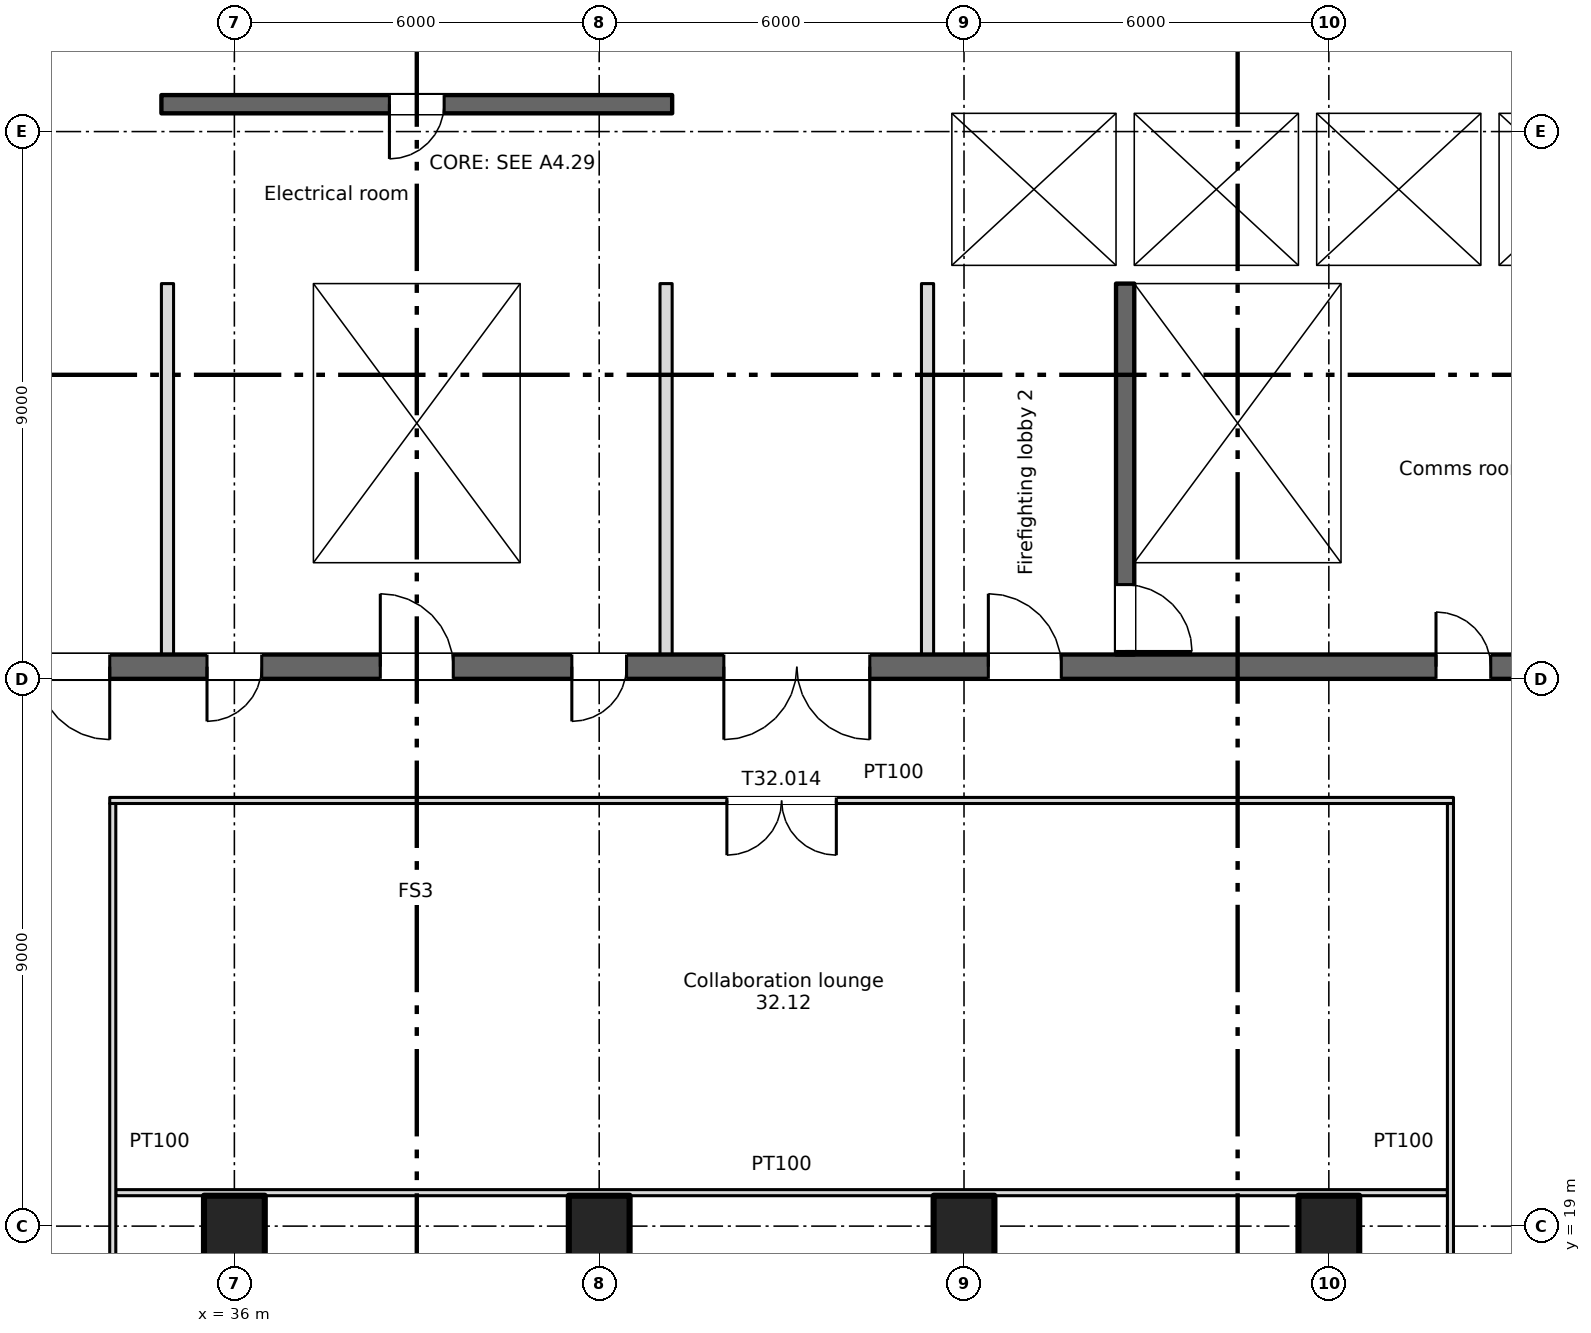
"""IFC4 building model, lengths in metres.
Left out: names, types, materials, properties, quantities, classifications, styles, units other than length and angle.
Written with IfcOpenShell. Run it as: python <this file> out.ifc"""

import sys

from ifc_helpers import new_model, si_unit, direction, frame, frame_2d, origin, origin_2d, place, context, subcontext, project, spatial, rectangle, extrude, element, fill, save


model = new_model("IFC4")
c1 = context("Model", 3, precision=1e-05, world=origin(), true_north=direction((0.0, 1.0)))
c2 = subcontext(c1, "Body", "Model", "MODEL_VIEW")
j1 = project(units=[si_unit("LENGTHUNIT", "METRE"), si_unit("PLANEANGLEUNIT", "RADIAN")], contexts=[c1])
p1 = place(None, origin())
s1 = spatial("IfcSite", under=j1, at=p1, CompositionType="ELEMENT")
p2 = place(p1, origin())
s2 = spatial("IfcBuilding", under=s1, at=p2, CompositionType="ELEMENT")
p3 = place(p2, frame((0.0, 0.0, 223.0)))
s3 = spatial("IfcBuildingStorey", under=s2, at=p3, CompositionType="ELEMENT", Elevation=223.0)
for number, where, z_axis, x_axis in (
    (1, (36.0, 19.0, 0.0), (0.0, 0.0, 1.0), (1.0, 0.0, 0.0)),
    (2, (42.0, 19.0, 0.0), (0.0, 0.0, 1.0), (1.0, 0.0, 0.0)),
    (3, (48.0, 19.0, 0.0), (0.0, 0.0, 1.0), (1.0, 0.0, 0.0)),
    (4, (54.0, 19.0, 0.0), (0.0, 0.0, 1.0), (1.0, 0.0, 0.0)),
):
    element("IfcColumn", number, at=place(p3, frame(where, z_axis=z_axis, x_axis=x_axis)), inside=s3, PredefinedType="COLUMN", context=c2, shape_type="SweptSolid", body=[
        extrude(rectangle(XDim=1.0, YDim=1.0, at=origin_2d()), origin(), (0.0, 0.0, 1.0), 3.15),
    ])
p4 = place(p3, frame((6.6, 28.2, 0.0), z_axis=(0.0, 0.0, 1.0), x_axis=(1.0, 0.0, 0.0)))
e5 = element("IfcWall", 5, at=p4, inside=s3, PredefinedType="SHEAR", context=c2, shape_type="SweptSolid", body=[
    extrude(rectangle(XDim=57.9, YDim=0.4, at=frame_2d((28.95, 0.0))), origin(), (0.0, 0.0, 1.0), 3.15),
])
p5 = place(p4, frame((12.163, 0.0, 0.0)))
e6 = element("IfcOpeningElement", 6, at=p5, cuts=e5, PredefinedType="OPENING", context=c2, shape_type="SweptSolid", body=[
    extrude(rectangle(XDim=0.9, YDim=2.1, at=frame_2d((0.45, 1.05))), frame((0.0, 0.21, 0.0), z_axis=(0.0, -1.0, 0.0), x_axis=(1.0, 0.0, 0.0)), (0.0, 0.0, 1.0), 0.42),
])
p6 = place(p4, frame((14.738, 0.0, 0.0)))
e7 = element("IfcOpeningElement", 7, at=p6, cuts=e5, PredefinedType="OPENING", context=c2, shape_type="SweptSolid", body=[
    extrude(rectangle(XDim=0.9, YDim=2.1, at=frame_2d((0.45, 1.05))), frame((0.0, 0.21, 0.0), z_axis=(0.0, -1.0, 0.0), x_axis=(1.0, 0.0, 0.0)), (0.0, 0.0, 1.0), 0.42),
])
p7 = place(p4, frame((49.163, 0.0, 0.0)))
e8 = element("IfcOpeningElement", 8, at=p7, cuts=e5, PredefinedType="OPENING", context=c2, shape_type="SweptSolid", body=[
    extrude(rectangle(XDim=0.9, YDim=2.1, at=frame_2d((0.45, 1.05))), frame((0.0, 0.21, 0.0), z_axis=(0.0, -1.0, 0.0), x_axis=(1.0, 0.0, 0.0)), (0.0, 0.0, 1.0), 0.42),
])
p8 = place(p4, frame((51.738, 0.0, 0.0)))
e9 = element("IfcOpeningElement", 9, at=p8, cuts=e5, PredefinedType="OPENING", context=c2, shape_type="SweptSolid", body=[
    extrude(rectangle(XDim=0.9, YDim=2.1, at=frame_2d((0.45, 1.05))), frame((0.0, 0.21, 0.0), z_axis=(0.0, -1.0, 0.0), x_axis=(1.0, 0.0, 0.0)), (0.0, 0.0, 1.0), 0.42),
])
p9 = place(p4, frame((1.45, 0.0, 0.0)))
e10 = element("IfcOpeningElement", 10, at=p9, cuts=e5, PredefinedType="OPENING", context=c2, shape_type="SweptSolid", body=[
    extrude(rectangle(XDim=0.9, YDim=2.1, at=frame_2d((0.45, 1.05))), frame((0.0, 0.21, 0.0), z_axis=(0.0, -1.0, 0.0), x_axis=(1.0, 0.0, 0.0)), (0.0, 0.0, 1.0), 0.42),
])
p10 = place(p4, frame((4.8, 0.0, 0.0)))
e11 = element("IfcOpeningElement", 11, at=p10, cuts=e5, PredefinedType="OPENING", context=c2, shape_type="SweptSolid", body=[
    extrude(rectangle(XDim=1.2, YDim=2.1, at=frame_2d((0.6, 1.05))), frame((0.0, 0.21, 0.0), z_axis=(0.0, -1.0, 0.0), x_axis=(1.0, 0.0, 0.0)), (0.0, 0.0, 1.0), 0.42),
])
p11 = place(p4, frame((31.8, 0.0, 0.0)))
e12 = element("IfcOpeningElement", 12, at=p11, cuts=e5, PredefinedType="OPENING", context=c2, shape_type="SweptSolid", body=[
    extrude(rectangle(XDim=1.2, YDim=2.1, at=frame_2d((0.6, 1.05))), frame((0.0, 0.21, 0.0), z_axis=(0.0, -1.0, 0.0), x_axis=(1.0, 0.0, 0.0)), (0.0, 0.0, 1.0), 0.42),
])
p12 = place(p4, frame((55.3, 0.0, 0.0)))
e13 = element("IfcOpeningElement", 13, at=p12, cuts=e5, PredefinedType="OPENING", context=c2, shape_type="SweptSolid", body=[
    extrude(rectangle(XDim=1.2, YDim=2.1, at=frame_2d((0.6, 1.05))), frame((0.0, 0.21, 0.0), z_axis=(0.0, -1.0, 0.0), x_axis=(1.0, 0.0, 0.0)), (0.0, 0.0, 1.0), 0.42),
])
p13 = place(p4, frame((21.8, 0.0, 0.0)))
e14 = element("IfcOpeningElement", 14, at=p13, cuts=e5, PredefinedType="OPENING", context=c2, shape_type="SweptSolid", body=[
    extrude(rectangle(XDim=1.2, YDim=2.1, at=frame_2d((0.6, 1.05))), frame((0.0, 0.21, 0.0), z_axis=(0.0, -1.0, 0.0), x_axis=(1.0, 0.0, 0.0)), (0.0, 0.0, 1.0), 0.42),
])
p14 = place(p4, frame((41.8, 0.0, 0.0)))
e15 = element("IfcOpeningElement", 15, at=p14, cuts=e5, PredefinedType="OPENING", context=c2, shape_type="SweptSolid", body=[
    extrude(rectangle(XDim=1.2, YDim=2.1, at=frame_2d((0.6, 1.05))), frame((0.0, 0.21, 0.0), z_axis=(0.0, -1.0, 0.0), x_axis=(1.0, 0.0, 0.0)), (0.0, 0.0, 1.0), 0.42),
])
p15 = place(p4, frame((24.95, 0.0, 0.0)))
e16 = element("IfcOpeningElement", 16, at=p15, cuts=e5, PredefinedType="OPENING", context=c2, shape_type="SweptSolid", body=[
    extrude(rectangle(XDim=2.4, YDim=2.1, at=frame_2d((1.2, 1.05))), frame((0.0, 0.21, 0.0), z_axis=(0.0, -1.0, 0.0), x_axis=(1.0, 0.0, 0.0)), (0.0, 0.0, 1.0), 0.42),
])
p16 = place(p4, frame((37.45, 0.0, 0.0)))
e17 = element("IfcOpeningElement", 17, at=p16, cuts=e5, PredefinedType="OPENING", context=c2, shape_type="SweptSolid", body=[
    extrude(rectangle(XDim=2.4, YDim=2.1, at=frame_2d((1.2, 1.05))), frame((0.0, 0.21, 0.0), z_axis=(0.0, -1.0, 0.0), x_axis=(1.0, 0.0, 0.0)), (0.0, 0.0, 1.0), 0.42),
])
p17 = place(p4, frame((8.1, 0.0, 0.0)))
e18 = element("IfcOpeningElement", 18, at=p17, cuts=e5, PredefinedType="OPENING", context=c2, shape_type="SweptSolid", body=[
    extrude(rectangle(XDim=2.4, YDim=2.1, at=frame_2d((1.2, 1.05))), frame((0.0, 0.21, 0.0), z_axis=(0.0, -1.0, 0.0), x_axis=(1.0, 0.0, 0.0)), (0.0, 0.0, 1.0), 0.42),
])
p18 = place(p4, frame((28.95, 0.0, 0.0)))
e19 = element("IfcOpeningElement", 19, at=p18, cuts=e5, PredefinedType="OPENING", context=c2, shape_type="SweptSolid", body=[
    extrude(rectangle(XDim=0.9, YDim=2.1, at=frame_2d((0.45, 1.05))), frame((0.0, 0.21, 0.0), z_axis=(0.0, -1.0, 0.0), x_axis=(1.0, 0.0, 0.0)), (0.0, 0.0, 1.0), 0.42),
])
p19 = place(p4, frame((34.95, 0.0, 0.0)))
e20 = element("IfcOpeningElement", 20, at=p19, cuts=e5, PredefinedType="OPENING", context=c2, shape_type="SweptSolid", body=[
    extrude(rectangle(XDim=0.9, YDim=2.1, at=frame_2d((0.45, 1.05))), frame((0.0, 0.21, 0.0), z_axis=(0.0, -1.0, 0.0), x_axis=(1.0, 0.0, 0.0)), (0.0, 0.0, 1.0), 0.42),
])
for number, where, z_axis, x_axis in (
    (21, (37.15, 28.4, 0.0), (0.0, 0.0, 1.0), (0.0, 1.0, 0.0)),
    (22, (40.85, 28.4, 0.0), (0.0, 0.0, 1.0), (0.0, 1.0, 0.0)),
):
    element("IfcWall", number, at=place(p3, frame(where, z_axis=z_axis, x_axis=x_axis)), inside=s3, PredefinedType="SHEAR", context=c2, shape_type="SweptSolid", body=[
        extrude(rectangle(XDim=6.1, YDim=0.3, at=frame_2d((3.05, 0.0))), origin(), (0.0, 0.0, 1.0), 3.15),
    ])
p20 = place(p3, frame((50.65, 34.5, 0.0), z_axis=(0.0, 0.0, 1.0), x_axis=(0.0, -1.0, 0.0)))
e23 = element("IfcWall", 23, at=p20, inside=s3, PredefinedType="SHEAR", context=c2, shape_type="SweptSolid", body=[
    extrude(rectangle(XDim=6.1, YDim=0.3, at=frame_2d((3.05, 0.0))), origin(), (0.0, 0.0, 1.0), 3.15),
])
p21 = place(p20, frame((4.95, 0.0, 0.0)))
e24 = element("IfcOpeningElement", 24, at=p21, cuts=e23, PredefinedType="OPENING", context=c2, shape_type="SweptSolid", body=[
    extrude(rectangle(XDim=1.1, YDim=2.1, at=frame_2d((0.55, 1.05))), frame((0.0, 0.16, 0.0), z_axis=(0.0, -1.0, 0.0), x_axis=(1.0, 0.0, 0.0)), (0.0, 0.0, 1.0), 0.32),
])
p22 = place(p3, frame((54.35, 28.4, 0.0), z_axis=(0.0, 0.0, 1.0), x_axis=(0.0, 1.0, 0.0)))
e25 = element("IfcWall", 25, at=p22, inside=s3, PredefinedType="SHEAR", context=c2, shape_type="SweptSolid", body=[
    extrude(rectangle(XDim=6.1, YDim=0.3, at=frame_2d((3.05, 0.0))), origin(), (0.0, 0.0, 1.0), 3.15),
])
p23 = place(p3, frame((34.8, 34.65, 0.0), z_axis=(0.0, 0.0, 1.0), x_axis=(1.0, 0.0, 0.0)))
e26 = element("IfcWall", 26, at=p23, inside=s3, PredefinedType="SHEAR", context=c2, shape_type="SweptSolid", body=[
    extrude(rectangle(XDim=8.4, YDim=0.3, at=frame_2d((4.2, 0.0))), origin(), (0.0, 0.0, 1.0), 3.15),
])
p24 = place(p3, frame((47.3, 34.65, 0.0), z_axis=(0.0, 0.0, 1.0), x_axis=(1.0, 0.0, 0.0)))
e27 = element("IfcWall", 27, at=p24, inside=s3, PredefinedType="SHEAR", context=c2, shape_type="SweptSolid", body=[
    extrude(rectangle(XDim=12.2, YDim=0.3, at=frame_2d((6.1, 0.0))), origin(), (0.0, 0.0, 1.0), 3.15),
])
p25 = place(p24, frame((1.3, 0.0, 0.0)))
e28 = element("IfcOpeningElement", 28, at=p25, cuts=e27, PredefinedType="OPENING", context=c2, shape_type="SweptSolid", body=[
    extrude(rectangle(XDim=1.1, YDim=2.1, at=frame_2d((0.55, 1.05))), frame((0.0, 0.16, 0.0), z_axis=(0.0, -1.0, 0.0), x_axis=(1.0, 0.0, 0.0)), (0.0, 0.0, 1.0), 0.32),
])
p26 = place(p3, frame((43.2, 37.45, 0.0), z_axis=(0.0, 0.0, 1.0), x_axis=(-1.0, 0.0, 0.0)))
e29 = element("IfcWall", 29, at=p26, inside=s3, PredefinedType="SHEAR", context=c2, shape_type="SweptSolid", body=[
    extrude(rectangle(XDim=8.4, YDim=0.3, at=frame_2d((4.2, 0.0))), origin(), (0.0, 0.0, 1.0), 3.15),
])
p27 = place(p26, frame((3.75, 0.0, 0.0)))
e30 = element("IfcOpeningElement", 30, at=p27, cuts=e29, PredefinedType="OPENING", context=c2, shape_type="SweptSolid", body=[
    extrude(rectangle(XDim=0.9, YDim=2.1, at=frame_2d((0.45, 1.05))), frame((0.0, 0.16, 0.0), z_axis=(0.0, -1.0, 0.0), x_axis=(1.0, 0.0, 0.0)), (0.0, 0.0, 1.0), 0.32),
])
p28 = place(p3, frame((47.3, 37.45, 0.0), z_axis=(0.0, 0.0, 1.0), x_axis=(1.0, 0.0, 0.0)))
e31 = element("IfcWall", 31, at=p28, inside=s3, PredefinedType="SHEAR", context=c2, shape_type="SweptSolid", body=[
    extrude(rectangle(XDim=12.2, YDim=0.3, at=frame_2d((6.1, 0.0))), origin(), (0.0, 0.0, 1.0), 3.15),
])
p29 = place(p28, frame((4.3, 0.0, 0.0)))
e32 = element("IfcOpeningElement", 32, at=p29, cuts=e31, PredefinedType="OPENING", context=c2, shape_type="SweptSolid", body=[
    extrude(rectangle(XDim=1.1, YDim=2.1, at=frame_2d((0.55, 1.05))), frame((0.0, 0.16, 0.0), z_axis=(0.0, -1.0, 0.0), x_axis=(1.0, 0.0, 0.0)), (0.0, 0.0, 1.0), 0.32),
])
p30 = place(p28, frame((7.3, 0.0, 0.0)))
e33 = element("IfcOpeningElement", 33, at=p30, cuts=e31, PredefinedType="OPENING", context=c2, shape_type="SweptSolid", body=[
    extrude(rectangle(XDim=1.1, YDim=2.1, at=frame_2d((0.55, 1.05))), frame((0.0, 0.16, 0.0), z_axis=(0.0, -1.0, 0.0), x_axis=(1.0, 0.0, 0.0)), (0.0, 0.0, 1.0), 0.32),
])
p31 = place(p28, frame((10.3, 0.0, 0.0)))
e34 = element("IfcOpeningElement", 34, at=p31, cuts=e31, PredefinedType="OPENING", context=c2, shape_type="SweptSolid", body=[
    extrude(rectangle(XDim=1.1, YDim=2.1, at=frame_2d((0.55, 1.05))), frame((0.0, 0.16, 0.0), z_axis=(0.0, -1.0, 0.0), x_axis=(1.0, 0.0, 0.0)), (0.0, 0.0, 1.0), 0.32),
])
for number, where, z_axis, x_axis in (
    (35, (34.95, 34.8, 0.0), (0.0, 0.0, 1.0), (0.0, 1.0, 0.0)),
    (36, (43.05, 34.8, 0.0), (0.0, 0.0, 1.0), (0.0, 1.0, 0.0)),
):
    element("IfcWall", number, at=place(p3, frame(where, z_axis=z_axis, x_axis=x_axis)), inside=s3, PredefinedType="SHEAR", context=c2, shape_type="SweptSolid", body=[
        extrude(rectangle(XDim=2.5, YDim=0.3, at=frame_2d((1.25, 0.0))), origin(), (0.0, 0.0, 1.0), 3.15),
    ])
p32 = place(p3, frame((47.55, 34.8, 0.0), z_axis=(0.0, 0.0, 1.0), x_axis=(0.0, 1.0, 0.0)))
e37 = element("IfcWall", 37, at=p32, inside=s3, PredefinedType="SHEAR", context=c2, shape_type="SweptSolid", body=[
    extrude(rectangle(XDim=2.5, YDim=0.5, at=frame_2d((1.25, 0.0))), origin(), (0.0, 0.0, 1.0), 3.15),
])
for number, where, z_axis, x_axis in (
    (38, (50.65, 34.8, 0.0), (0.0, 0.0, 1.0), (0.0, 1.0, 0.0)),
    (39, (53.65, 34.8, 0.0), (0.0, 0.0, 1.0), (0.0, 1.0, 0.0)),
    (40, (56.65, 34.8, 0.0), (0.0, 0.0, 1.0), (0.0, 1.0, 0.0)),
):
    element("IfcWall", number, at=place(p3, frame(where, z_axis=z_axis, x_axis=x_axis)), inside=s3, PredefinedType="SHEAR", context=c2, shape_type="SweptSolid", body=[
        extrude(rectangle(XDim=2.5, YDim=0.3, at=frame_2d((1.25, 0.0))), origin(), (0.0, 0.0, 1.0), 3.15),
    ])
for number, where, z_axis, x_axis in (
    (41, (34.9, 28.4, 0.0), (0.0, 0.0, 1.0), (0.0, 1.0, 0.0)),
    (42, (43.1, 28.4, 0.0), (0.0, 0.0, 1.0), (0.0, 1.0, 0.0)),
    (43, (47.4, 28.4, 0.0), (0.0, 0.0, 1.0), (0.0, 1.0, 0.0)),
):
    element("IfcWall", number, at=place(p3, frame(where, z_axis=z_axis, x_axis=x_axis)), inside=s3, PredefinedType="PARTITIONING", context=c2, shape_type="SweptSolid", body=[
        extrude(rectangle(XDim=6.1, YDim=0.2, at=frame_2d((3.05, 0.0))), origin(), (0.0, 0.0, 1.0), 3.15),
    ])
p33 = place(p3, frame((34.05, 19.55, 0.0), z_axis=(0.0, 0.0, 1.0), x_axis=(1.0, 0.0, 0.0)))
e44 = element("IfcWall", 44, at=p33, inside=s3, PredefinedType="PARTITIONING", context=c2, shape_type="SweptSolid", body=[
    extrude(rectangle(XDim=21.9, YDim=0.1, at=frame_2d((10.95, 0.0))), origin(), (0.0, 0.0, 1.0), 3.15),
])
p34 = place(p3, frame((33.95, 26.0, 0.0), z_axis=(0.0, 0.0, 1.0), x_axis=(1.0, 0.0, 0.0)))
e45 = element("IfcWall", 45, at=p34, inside=s3, PredefinedType="PARTITIONING", context=c2, shape_type="SweptSolid", body=[
    extrude(rectangle(XDim=22.1, YDim=0.1, at=frame_2d((11.05, 0.0))), origin(), (0.0, 0.0, 1.0), 3.15),
])
p35 = place(p34, frame((10.15, 0.0, 0.0)))
e46 = element("IfcOpeningElement", 46, at=p35, cuts=e45, PredefinedType="OPENING", context=c2, shape_type="SweptSolid", body=[
    extrude(rectangle(XDim=1.8, YDim=2.1, at=frame_2d((0.9, 1.05))), frame((0.0, 0.06, 0.0), z_axis=(0.0, -1.0, 0.0), x_axis=(1.0, 0.0, 0.0)), (0.0, 0.0, 1.0), 0.12),
])
for number, where, z_axis, x_axis in (
    (47, (34.0, 12.6, 0.0), (0.0, 0.0, 1.0), (0.0, 1.0, 0.0)),
    (48, (56.0, 12.6, 0.0), (0.0, 0.0, 1.0), (0.0, 1.0, 0.0)),
):
    element("IfcWall", number, at=place(p3, frame(where, z_axis=z_axis, x_axis=x_axis)), inside=s3, PredefinedType="PARTITIONING", context=c2, shape_type="SweptSolid", body=[
        extrude(rectangle(XDim=13.35, YDim=0.1, at=frame_2d((6.675, 0.0))), origin(), (0.0, 0.0, 1.0), 3.15),
    ])
p36 = place(p7, origin())
e49 = element("IfcDoor", 49, at=p36, inside=s3, OperationType="SINGLE_SWING_LEFT", PredefinedType="DOOR", context=c2, shape_type="SweptSolid", body=[
    extrude(rectangle(XDim=0.9, YDim=2.1, at=frame_2d((0.45, 1.05))), frame((0.0, 0.025, 0.0), z_axis=(0.0, -1.0, 0.0), x_axis=(1.0, 0.0, 0.0)), (0.0, 0.0, 1.0), 0.05),
])
fill(e8, e49)
p37 = place(p27, origin())
e50 = element("IfcDoor", 50, at=p37, inside=s3, OperationType="SINGLE_SWING_RIGHT", PredefinedType="DOOR", context=c2, shape_type="SweptSolid", body=[
    extrude(rectangle(XDim=0.9, YDim=2.1, at=frame_2d((0.45, 1.05))), frame((0.0, 0.025, 0.0), z_axis=(0.0, -1.0, 0.0), x_axis=(1.0, 0.0, 0.0)), (0.0, 0.0, 1.0), 0.05),
])
fill(e30, e50)
p38 = place(p29, origin())
e51 = element("IfcDoor", 51, at=p38, inside=s3, OperationType="SLIDING_TO_LEFT", PredefinedType="DOOR", context=c2, shape_type="SweptSolid", body=[
    extrude(rectangle(XDim=1.1, YDim=2.1, at=frame_2d((0.55, 1.05))), frame((0.0, 0.025, 0.0), z_axis=(0.0, -1.0, 0.0), x_axis=(1.0, 0.0, 0.0)), (0.0, 0.0, 1.0), 0.05),
])
fill(e32, e51)
p39 = place(p30, origin())
e52 = element("IfcDoor", 52, at=p39, inside=s3, OperationType="SLIDING_TO_LEFT", PredefinedType="DOOR", context=c2, shape_type="SweptSolid", body=[
    extrude(rectangle(XDim=1.1, YDim=2.1, at=frame_2d((0.55, 1.05))), frame((0.0, 0.025, 0.0), z_axis=(0.0, -1.0, 0.0), x_axis=(1.0, 0.0, 0.0)), (0.0, 0.0, 1.0), 0.05),
])
fill(e33, e52)
p40 = place(p25, origin())
e53 = element("IfcDoor", 53, at=p40, inside=s3, OperationType="SLIDING_TO_LEFT", PredefinedType="DOOR", context=c2, shape_type="SweptSolid", body=[
    extrude(rectangle(XDim=1.1, YDim=2.1, at=frame_2d((0.55, 1.05))), frame((0.0, 0.025, 0.0), z_axis=(0.0, -1.0, 0.0), x_axis=(1.0, 0.0, 0.0)), (0.0, 0.0, 1.0), 0.05),
])
fill(e28, e53)
p41 = place(p11, origin())
e54 = element("IfcDoor", 54, at=p41, inside=s3, OperationType="SINGLE_SWING_LEFT", PredefinedType="DOOR", context=c2, shape_type="SweptSolid", body=[
    extrude(rectangle(XDim=1.2, YDim=2.1, at=frame_2d((0.6, 1.05))), frame((0.0, 0.025, 0.0), z_axis=(0.0, -1.0, 0.0), x_axis=(1.0, 0.0, 0.0)), (0.0, 0.0, 1.0), 0.05),
])
fill(e12, e54)
p42 = place(p21, origin())
e55 = element("IfcDoor", 55, at=p42, inside=s3, OperationType="SINGLE_SWING_RIGHT", PredefinedType="DOOR", context=c2, shape_type="SweptSolid", body=[
    extrude(rectangle(XDim=1.1, YDim=2.1, at=frame_2d((0.55, 1.05))), frame((0.0, 0.025, 0.0), z_axis=(0.0, -1.0, 0.0), x_axis=(1.0, 0.0, 0.0)), (0.0, 0.0, 1.0), 0.05),
])
fill(e24, e55)
p43 = place(p14, origin())
e56 = element("IfcDoor", 56, at=p43, inside=s3, OperationType="SINGLE_SWING_LEFT", PredefinedType="DOOR", context=c2, shape_type="SweptSolid", body=[
    extrude(rectangle(XDim=1.2, YDim=2.1, at=frame_2d((0.6, 1.05))), frame((0.0, 0.025, 0.0), z_axis=(0.0, -1.0, 0.0), x_axis=(1.0, 0.0, 0.0)), (0.0, 0.0, 1.0), 0.05),
])
fill(e15, e56)
p44 = place(p15, origin())
e57 = element("IfcDoor", 57, at=p44, inside=s3, OperationType="DOUBLE_DOOR_SINGLE_SWING", PredefinedType="DOOR", context=c2, shape_type="SweptSolid", body=[
    extrude(rectangle(XDim=2.4, YDim=2.1, at=frame_2d((1.2, 1.05))), frame((0.0, 0.025, 0.0), z_axis=(0.0, -1.0, 0.0), x_axis=(1.0, 0.0, 0.0)), (0.0, 0.0, 1.0), 0.05),
])
fill(e16, e57)
p45 = place(p16, origin())
e58 = element("IfcDoor", 58, at=p45, inside=s3, OperationType="DOUBLE_DOOR_SINGLE_SWING", PredefinedType="DOOR", context=c2, shape_type="SweptSolid", body=[
    extrude(rectangle(XDim=2.4, YDim=2.1, at=frame_2d((1.2, 1.05))), frame((0.0, 0.025, 0.0), z_axis=(0.0, -1.0, 0.0), x_axis=(1.0, 0.0, 0.0)), (0.0, 0.0, 1.0), 0.05),
])
fill(e17, e58)
p46 = place(p18, origin())
e59 = element("IfcDoor", 59, at=p46, inside=s3, OperationType="SINGLE_SWING_LEFT", PredefinedType="DOOR", context=c2, shape_type="SweptSolid", body=[
    extrude(rectangle(XDim=0.9, YDim=2.1, at=frame_2d((0.45, 1.05))), frame((0.0, 0.025, 0.0), z_axis=(0.0, -1.0, 0.0), x_axis=(1.0, 0.0, 0.0)), (0.0, 0.0, 1.0), 0.05),
])
fill(e19, e59)
p47 = place(p19, origin())
e60 = element("IfcDoor", 60, at=p47, inside=s3, OperationType="SINGLE_SWING_LEFT", PredefinedType="DOOR", context=c2, shape_type="SweptSolid", body=[
    extrude(rectangle(XDim=0.9, YDim=2.1, at=frame_2d((0.45, 1.05))), frame((0.0, 0.025, 0.0), z_axis=(0.0, -1.0, 0.0), x_axis=(1.0, 0.0, 0.0)), (0.0, 0.0, 1.0), 0.05),
])
fill(e20, e60)
p48 = place(p35, origin())
e61 = element("IfcDoor", 61, at=p48, inside=s3, OperationType="DOUBLE_DOOR_SINGLE_SWING", PredefinedType="DOOR", context=c2, shape_type="SweptSolid", body=[
    extrude(rectangle(XDim=1.8, YDim=2.1, at=frame_2d((0.9, 1.05))), frame((0.0, 0.025, 0.0), z_axis=(0.0, -1.0, 0.0), x_axis=(1.0, 0.0, 0.0)), (0.0, 0.0, 1.0), 0.05),
])
fill(e46, e61)
save(model, sys.argv[1])
